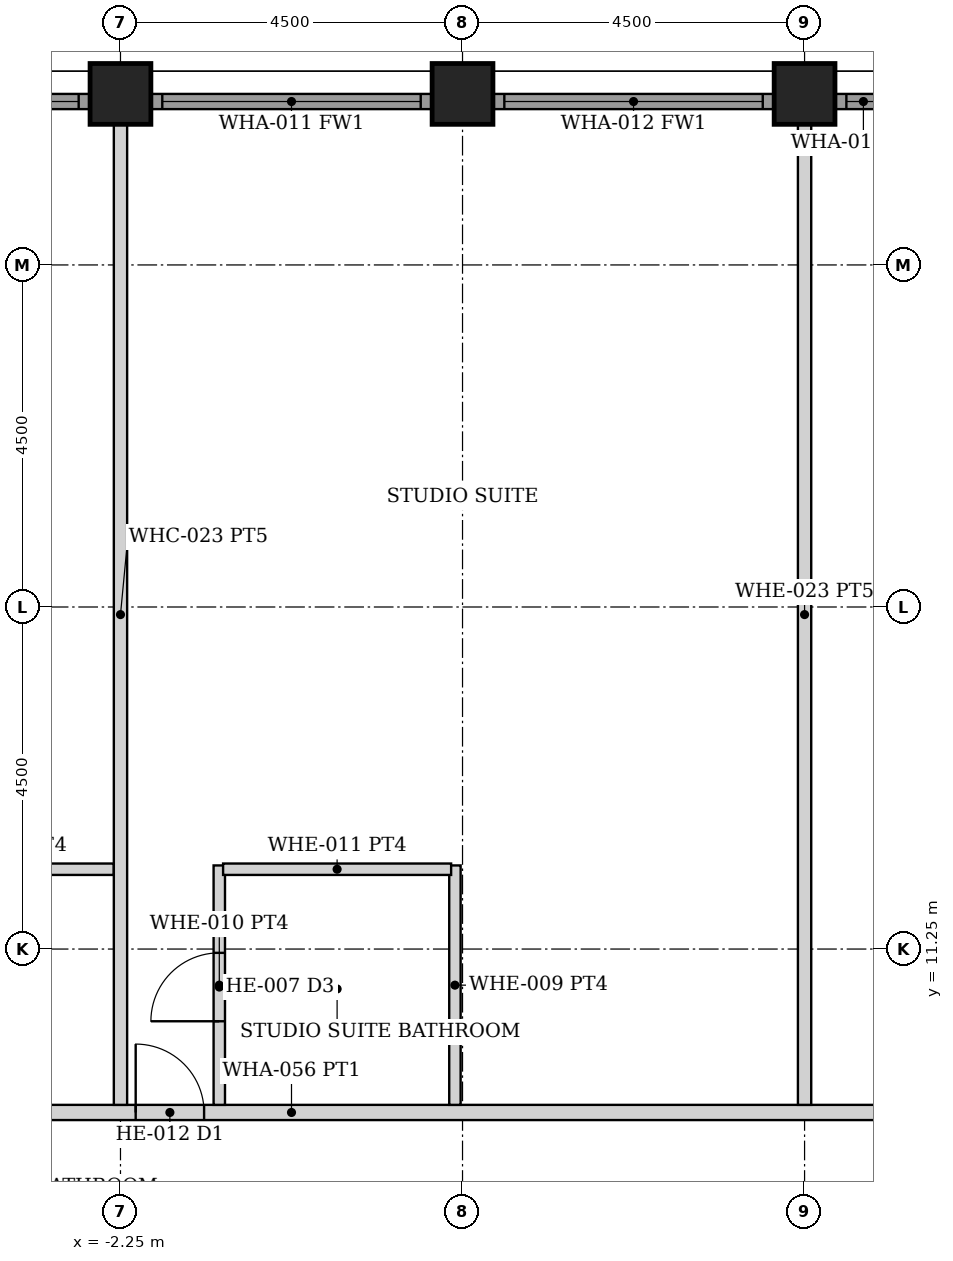
"""IFC4 building model, lengths in metres.
Left out: names, types, materials, properties, quantities, classifications, styles, units other than length and angle.
Written with IfcOpenShell. Run it as: python <this file> out.ifc"""

import sys

from ifc_helpers import new_model, si_unit, direction, frame, frame_2d, origin, origin_2d, place, context, subcontext, project, spatial, rectangle, hollow_rectangle, extrude, element, fill, save


model = new_model("IFC4")
c1 = context("Model", 3, precision=1e-05, world=origin(), true_north=direction((0.0, 1.0)))
c2 = subcontext(c1, "Body", "Model", "MODEL_VIEW")
j1 = project(units=[si_unit("LENGTHUNIT", "METRE"), si_unit("PLANEANGLEUNIT", "RADIAN")], contexts=[c1])
p1 = place(None, origin())
s1 = spatial("IfcSite", under=j1, at=p1, CompositionType="ELEMENT")
p2 = place(p1, origin())
s2 = spatial("IfcBuilding", under=s1, at=p2, CompositionType="ELEMENT")
p3 = place(p2, frame((0.0, 0.0, 161.6)))
s3 = spatial("IfcBuildingStorey", under=s2, at=p3, CompositionType="ELEMENT", Elevation=161.6)
for number, where, z_axis, x_axis in (
    (1, (-2.25, 22.5, 0.0), (0.0, 0.0, 1.0), (0.0, 1.0, 0.0)),
    (2, (2.25, 22.5, 0.0), (0.0, 0.0, 1.0), (0.0, 1.0, 0.0)),
    (3, (6.75, 22.5, 0.0), (0.0, 0.0, 1.0), (0.0, 1.0, 0.0)),
):
    element("IfcColumn", number, at=place(p3, frame(where, z_axis=z_axis, x_axis=x_axis)), inside=s3, PredefinedType="COLUMN", context=c2, shape_type="SweptSolid", body=[
        extrude(hollow_rectangle(XDim=0.8, YDim=0.8, WallThickness=0.05, at=origin_2d()), origin(), (0.0, 0.0, 1.0), 3.6),
    ])
p4 = place(p3, frame((-6.345, 22.4, 0.0), z_axis=(0.0, 0.0, 1.0), x_axis=(1.0, 0.0, 0.0)))
e4 = element("IfcWall", 4, at=p4, inside=s3, PredefinedType="SOLIDWALL", context=c2, shape_type="SweptSolid", body=[
    extrude(rectangle(XDim=3.69, YDim=0.2, at=frame_2d((1.845, 0.0))), origin(), (0.0, 0.0, 1.0), 2.479),
])
p5 = place(p4, frame((0.145, 0.0, 0.3)))
e5 = element("IfcOpeningElement", 5, at=p5, cuts=e4, PredefinedType="OPENING", context=c2, shape_type="SweptSolid", body=[
    extrude(rectangle(XDim=3.4, YDim=2.029, at=frame_2d((1.7, 1.015))), frame((0.0, 0.11, 0.0), z_axis=(0.0, -1.0, 0.0), x_axis=(1.0, 0.0, 0.0)), (0.0, 0.0, 1.0), 0.22),
])
p6 = place(p3, frame((-1.845, 22.4, 0.0), z_axis=(0.0, 0.0, 1.0), x_axis=(1.0, 0.0, 0.0)))
e6 = element("IfcWall", 6, at=p6, inside=s3, PredefinedType="SOLIDWALL", context=c2, shape_type="SweptSolid", body=[
    extrude(rectangle(XDim=3.69, YDim=0.2, at=frame_2d((1.845, 0.0))), origin(), (0.0, 0.0, 1.0), 2.479),
])
p7 = place(p6, frame((0.145, 0.0, 0.3)))
e7 = element("IfcOpeningElement", 7, at=p7, cuts=e6, PredefinedType="OPENING", context=c2, shape_type="SweptSolid", body=[
    extrude(rectangle(XDim=3.4, YDim=2.029, at=frame_2d((1.7, 1.015))), frame((0.0, 0.11, 0.0), z_axis=(0.0, -1.0, 0.0), x_axis=(1.0, 0.0, 0.0)), (0.0, 0.0, 1.0), 0.22),
])
p8 = place(p3, frame((2.655, 22.4, 0.0), z_axis=(0.0, 0.0, 1.0), x_axis=(1.0, 0.0, 0.0)))
e8 = element("IfcWall", 8, at=p8, inside=s3, PredefinedType="SOLIDWALL", context=c2, shape_type="SweptSolid", body=[
    extrude(rectangle(XDim=3.69, YDim=0.2, at=frame_2d((1.845, 0.0))), origin(), (0.0, 0.0, 1.0), 2.479),
])
p9 = place(p8, frame((0.145, 0.0, 0.3)))
e9 = element("IfcOpeningElement", 9, at=p9, cuts=e8, PredefinedType="OPENING", context=c2, shape_type="SweptSolid", body=[
    extrude(rectangle(XDim=3.4, YDim=2.029, at=frame_2d((1.7, 1.015))), frame((0.0, 0.11, 0.0), z_axis=(0.0, -1.0, 0.0), x_axis=(1.0, 0.0, 0.0)), (0.0, 0.0, 1.0), 0.22),
])
p10 = place(p3, frame((7.155, 22.4, 0.0), z_axis=(0.0, 0.0, 1.0), x_axis=(1.0, 0.0, 0.0)))
e10 = element("IfcWall", 10, at=p10, inside=s3, PredefinedType="SOLIDWALL", context=c2, shape_type="SweptSolid", body=[
    extrude(rectangle(XDim=3.69, YDim=0.2, at=frame_2d((1.845, 0.0))), origin(), (0.0, 0.0, 1.0), 2.479),
])
p11 = place(p10, frame((0.145, 0.0, 0.3)))
e11 = element("IfcOpeningElement", 11, at=p11, cuts=e10, PredefinedType="OPENING", context=c2, shape_type="SweptSolid", body=[
    extrude(rectangle(XDim=3.4, YDim=2.029, at=frame_2d((1.7, 1.015))), frame((0.0, 0.11, 0.0), z_axis=(0.0, -1.0, 0.0), x_axis=(1.0, 0.0, 0.0)), (0.0, 0.0, 1.0), 0.22),
])
p12 = place(p3, frame((-22.3, 9.1, 0.0), z_axis=(0.0, 0.0, 1.0), x_axis=(1.0, 0.0, 0.0)))
e12 = element("IfcWall", 12, at=p12, inside=s3, PredefinedType="PARTITIONING", context=c2, shape_type="SweptSolid", body=[
    extrude(rectangle(XDim=44.6, YDim=0.2, at=frame_2d((22.3, 0.0))), origin(), (0.0, 0.0, 1.0), 2.473),
])
p13 = place(p12, frame((6.75, 0.0, 0.0)))
e13 = element("IfcOpeningElement", 13, at=p13, cuts=e12, PredefinedType="OPENING", context=c2, shape_type="SweptSolid", body=[
    extrude(rectangle(XDim=0.9, YDim=2.1, at=frame_2d((0.45, 1.05))), frame((0.0, 0.11, 0.0), z_axis=(0.0, -1.0, 0.0), x_axis=(1.0, 0.0, 0.0)), (0.0, 0.0, 1.0), 0.22),
])
p14 = place(p12, frame((15.75, 0.0, 0.0)))
e14 = element("IfcOpeningElement", 14, at=p14, cuts=e12, PredefinedType="OPENING", context=c2, shape_type="SweptSolid", body=[
    extrude(rectangle(XDim=0.9, YDim=2.1, at=frame_2d((0.45, 1.05))), frame((0.0, 0.11, 0.0), z_axis=(0.0, -1.0, 0.0), x_axis=(1.0, 0.0, 0.0)), (0.0, 0.0, 1.0), 0.22),
])
p15 = place(p12, frame((20.25, 0.0, 0.0)))
e15 = element("IfcOpeningElement", 15, at=p15, cuts=e12, PredefinedType="OPENING", context=c2, shape_type="SweptSolid", body=[
    extrude(rectangle(XDim=0.9, YDim=2.1, at=frame_2d((0.45, 1.05))), frame((0.0, 0.11, 0.0), z_axis=(0.0, -1.0, 0.0), x_axis=(1.0, 0.0, 0.0)), (0.0, 0.0, 1.0), 0.22),
])
p16 = place(p12, frame((36.95, 0.0, 0.0)))
e16 = element("IfcOpeningElement", 16, at=p16, cuts=e12, PredefinedType="OPENING", context=c2, shape_type="SweptSolid", body=[
    extrude(rectangle(XDim=0.9, YDim=2.1, at=frame_2d((0.45, 1.05))), frame((0.0, 0.11, 0.0), z_axis=(0.0, -1.0, 0.0), x_axis=(1.0, 0.0, 0.0)), (0.0, 0.0, 1.0), 0.22),
])
p17 = place(p12, frame((38.85, 0.0, 0.0)))
e17 = element("IfcOpeningElement", 17, at=p17, cuts=e12, PredefinedType="OPENING", context=c2, shape_type="SweptSolid", body=[
    extrude(rectangle(XDim=0.9, YDim=2.1, at=frame_2d((0.45, 1.05))), frame((0.0, 0.11, 0.0), z_axis=(0.0, -1.0, 0.0), x_axis=(1.0, 0.0, 0.0)), (0.0, 0.0, 1.0), 0.22),
])
p18 = place(p12, frame((4.85, 0.0, 0.0)))
e18 = element("IfcOpeningElement", 18, at=p18, cuts=e12, PredefinedType="OPENING", context=c2, shape_type="SweptSolid", body=[
    extrude(rectangle(XDim=0.9, YDim=2.1, at=frame_2d((0.45, 1.05))), frame((0.0, 0.11, 0.0), z_axis=(0.0, -1.0, 0.0), x_axis=(1.0, 0.0, 0.0)), (0.0, 0.0, 1.0), 0.22),
])
p19 = place(p3, frame((-5.4, 12.3, 0.0), z_axis=(0.0, 0.0, 1.0), x_axis=(1.0, 0.0, 0.0)))
e19 = element("IfcWall", 19, at=p19, inside=s3, PredefinedType="PARTITIONING", context=c2, shape_type="SweptSolid", body=[
    extrude(rectangle(XDim=3.062, YDim=0.15, at=frame_2d((1.531, 0.0))), origin(), (0.0, 0.0, 1.0), 2.473),
])
p20 = place(p3, frame((-0.95, 9.2, 0.0), z_axis=(0.0, 0.0, 1.0), x_axis=(0.0, 1.0, 0.0)))
e20 = element("IfcWall", 20, at=p20, inside=s3, PredefinedType="PARTITIONING", context=c2, shape_type="SweptSolid", body=[
    extrude(rectangle(XDim=3.15, YDim=0.15, at=frame_2d((1.575, 0.0))), origin(), (0.0, 0.0, 1.0), 2.473),
])
p21 = place(p20, frame((1.1, 0.0, 0.0)))
e21 = element("IfcOpeningElement", 21, at=p21, cuts=e20, PredefinedType="OPENING", context=c2, shape_type="SweptSolid", body=[
    extrude(rectangle(XDim=0.9, YDim=2.1, at=frame_2d((0.45, 1.05))), frame((0.0, 0.085, 0.0), z_axis=(0.0, -1.0, 0.0), x_axis=(1.0, 0.0, 0.0)), (0.0, 0.0, 1.0), 0.17),
])
p22 = place(p3, frame((2.15, 9.2, 0.0), z_axis=(0.0, 0.0, 1.0), x_axis=(0.0, 1.0, 0.0)))
e22 = element("IfcWall", 22, at=p22, inside=s3, PredefinedType="PARTITIONING", context=c2, shape_type="SweptSolid", body=[
    extrude(rectangle(XDim=3.15, YDim=0.15, at=frame_2d((1.575, 0.0))), origin(), (0.0, 0.0, 1.0), 2.473),
])
p23 = place(p3, frame((-0.9, 12.3, 0.0), z_axis=(0.0, 0.0, 1.0), x_axis=(1.0, 0.0, 0.0)))
e23 = element("IfcWall", 23, at=p23, inside=s3, PredefinedType="PARTITIONING", context=c2, shape_type="SweptSolid", body=[
    extrude(rectangle(XDim=3.0, YDim=0.15, at=frame_2d((1.5, 0.0))), origin(), (0.0, 0.0, 1.0), 2.473),
])
for number, where, z_axis, x_axis in (
    (24, (-2.25, 9.2, 0.0), (0.0, 0.0, 1.0), (0.0, 1.0, 0.0)),
    (25, (6.75, 9.2, 0.0), (0.0, 0.0, 1.0), (0.0, 1.0, 0.0)),
):
    element("IfcWall", number, at=place(p3, frame(where, z_axis=z_axis, x_axis=x_axis)), inside=s3, PredefinedType="PARTITIONING", context=c2, shape_type="SweptSolid", body=[
        extrude(rectangle(XDim=12.9, YDim=0.175, at=frame_2d((6.45, 0.0))), origin(), (0.0, 0.0, 1.0), 2.473),
    ])
p24 = place(p5, origin())
e26 = element("IfcWindow", 26, at=p24, inside=s3, PartitioningType="SINGLE_PANEL", PredefinedType="WINDOW", context=c2, shape_type="SweptSolid", body=[
    extrude(rectangle(XDim=3.4, YDim=2.029, at=frame_2d((1.7, 1.015))), frame((0.0, 0.03, 0.0), z_axis=(0.0, -1.0, 0.0), x_axis=(1.0, 0.0, 0.0)), (0.0, 0.0, 1.0), 0.06),
])
fill(e5, e26)
p25 = place(p7, origin())
e27 = element("IfcWindow", 27, at=p25, inside=s3, PartitioningType="SINGLE_PANEL", PredefinedType="WINDOW", context=c2, shape_type="SweptSolid", body=[
    extrude(rectangle(XDim=3.4, YDim=2.029, at=frame_2d((1.7, 1.015))), frame((0.0, 0.03, 0.0), z_axis=(0.0, -1.0, 0.0), x_axis=(1.0, 0.0, 0.0)), (0.0, 0.0, 1.0), 0.06),
])
fill(e7, e27)
p26 = place(p9, origin())
e28 = element("IfcWindow", 28, at=p26, inside=s3, PartitioningType="SINGLE_PANEL", PredefinedType="WINDOW", context=c2, shape_type="SweptSolid", body=[
    extrude(rectangle(XDim=3.4, YDim=2.029, at=frame_2d((1.7, 1.015))), frame((0.0, 0.03, 0.0), z_axis=(0.0, -1.0, 0.0), x_axis=(1.0, 0.0, 0.0)), (0.0, 0.0, 1.0), 0.06),
])
fill(e9, e28)
p27 = place(p11, origin())
e29 = element("IfcWindow", 29, at=p27, inside=s3, PartitioningType="SINGLE_PANEL", PredefinedType="WINDOW", context=c2, shape_type="SweptSolid", body=[
    extrude(rectangle(XDim=3.4, YDim=2.029, at=frame_2d((1.7, 1.015))), frame((0.0, 0.03, 0.0), z_axis=(0.0, -1.0, 0.0), x_axis=(1.0, 0.0, 0.0)), (0.0, 0.0, 1.0), 0.06),
])
fill(e11, e29)
p28 = place(p15, origin())
e30 = element("IfcDoor", 30, at=p28, inside=s3, OperationType="SINGLE_SWING_LEFT", PredefinedType="DOOR", context=c2, shape_type="SweptSolid", body=[
    extrude(rectangle(XDim=0.9, YDim=2.1, at=frame_2d((0.45, 1.05))), frame((0.0, 0.025, 0.0), z_axis=(0.0, -1.0, 0.0), x_axis=(1.0, 0.0, 0.0)), (0.0, 0.0, 1.0), 0.05),
])
fill(e15, e30)
p29 = place(p21, origin())
e31 = element("IfcDoor", 31, at=p29, inside=s3, OperationType="SINGLE_SWING_LEFT", PredefinedType="DOOR", context=c2, shape_type="SweptSolid", body=[
    extrude(rectangle(XDim=0.9, YDim=2.1, at=frame_2d((0.45, 1.05))), frame((0.0, 0.025, 0.0), z_axis=(0.0, -1.0, 0.0), x_axis=(1.0, 0.0, 0.0)), (0.0, 0.0, 1.0), 0.05),
])
fill(e21, e31)
save(model, sys.argv[1])
